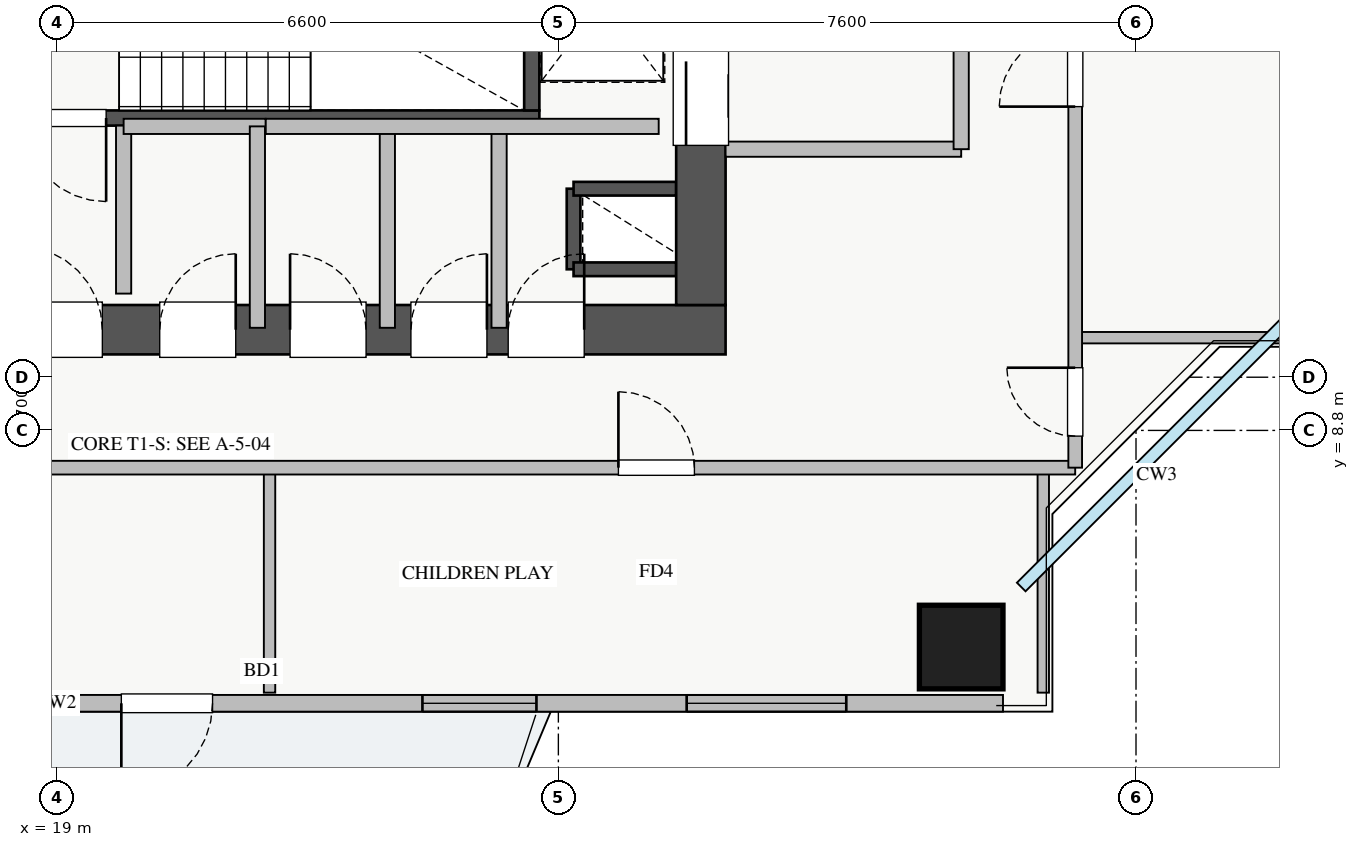
"""IFC4 building model, lengths in metres.
Left out: names, types, materials, properties, quantities, classifications, styles, units other than length and angle.
Written with IfcOpenShell. Run it as: python <this file> out.ifc"""

import sys

from ifc_helpers import new_model, si_unit, direction, frame, frame_2d, origin, origin_2d, place, context, subcontext, project, spatial, rectangle, extrude, source, transform, mapped, element, fill, save


model = new_model("IFC4")
c1 = context("Model", 3, precision=1e-05, world=origin(), true_north=direction((0.0, 1.0)))
c2 = subcontext(c1, "Body", "Model", "MODEL_VIEW")
j1 = project(units=[si_unit("LENGTHUNIT", "METRE"), si_unit("PLANEANGLEUNIT", "RADIAN")], contexts=[c1])
p1 = place(None, origin())
s1 = spatial("IfcSite", under=j1, at=p1, CompositionType="ELEMENT")
p2 = place(p1, origin())
s2 = spatial("IfcBuilding", under=s1, at=p2, CompositionType="ELEMENT")
p3 = place(p2, frame((0.0, 0.0, 132.75)))
s3 = spatial("IfcBuildingStorey", under=s2, at=p3, CompositionType="ELEMENT", Elevation=132.75)
p4 = place(p3, frame((25.8, 10.92, 0.0), z_axis=(0.0, 0.0, 1.0), x_axis=(0.0, 1.0, 0.0)))
e1 = element("IfcWall", 1, at=p4, inside=s3, PredefinedType="SHEAR", context=c2, shape_type="SweptSolid", body=[
    extrude(rectangle(XDim=1.06, YDim=0.18, at=frame_2d((0.53, 0.0))), origin(), (0.0, 0.0, 1.0), 3.07),
])
for number, where, z_axis, x_axis in (
    (2, (25.8, 11.98, 0.0), (0.0, 0.0, 1.0), (1.0, 0.0, 0.0)),
    (3, (25.8, 10.92, 0.0), (0.0, 0.0, 1.0), (1.0, 0.0, 0.0)),
):
    element("IfcWall", number, at=place(p3, frame(where, z_axis=z_axis, x_axis=x_axis)), inside=s3, PredefinedType="SHEAR", context=c2, shape_type="SweptSolid", body=[
        extrude(rectangle(XDim=1.35, YDim=0.18, at=frame_2d((0.675, 0.0))), origin(), (0.0, 0.0, 1.0), 3.07),
    ])
p5 = place(p3, frame((18.2, 12.91, 0.0), z_axis=(0.0, 0.0, 1.0), x_axis=(1.0, 0.0, 0.0)))
e4 = element("IfcWall", 4, at=p5, inside=s3, PredefinedType="SHEAR", context=c2, shape_type="SweptSolid", body=[
    extrude(rectangle(XDim=7.15, YDim=0.2, at=frame_2d((3.575, 0.0))), origin(), (0.0, 0.0, 1.0), 3.25),
])
p6 = place(p5, frame((0.35, 0.0, 0.0)))
e5 = element("IfcOpeningElement", 5, at=p6, cuts=e4, PredefinedType="OPENING", context=c2, shape_type="SweptSolid", body=[
    extrude(rectangle(XDim=1.1, YDim=2.05, at=frame_2d((0.55, 1.025))), frame((0.0, 0.11, 0.0), z_axis=(0.0, -1.0, 0.0), x_axis=(1.0, 0.0, 0.0)), (0.0, 0.0, 1.0), 0.22),
])
p7 = place(p3, frame((25.25, 13.01, 0.0), z_axis=(0.0, 0.0, 1.0), x_axis=(0.0, 1.0, 0.0)))
e6 = element("IfcWall", 6, at=p7, inside=s3, PredefinedType="SHEAR", context=c2, shape_type="SweptSolid", body=[
    extrude(rectangle(XDim=2.94, YDim=0.2, at=frame_2d((1.47, 0.0))), origin(), (0.0, 0.0, 1.0), 3.25),
])
p8 = place(p3, frame((10.2, 10.125, 0.0), z_axis=(0.0, 0.0, 1.0), x_axis=(1.0, 0.0, 0.0)))
e7 = element("IfcWall", 7, at=p8, inside=s3, PredefinedType="SHEAR", context=c2, shape_type="SweptSolid", body=[
    extrude(rectangle(XDim=17.6, YDim=0.65, at=frame_2d((8.8, 0.0))), origin(), (0.0, 0.0, 1.0), 3.25),
])
p9 = place(p8, frame((1.15, 0.0, 0.0)))
e8 = element("IfcOpeningElement", 8, at=p9, cuts=e7, PredefinedType="OPENING", context=c2, shape_type="SweptSolid", body=[
    extrude(rectangle(XDim=1.1, YDim=2.05, at=frame_2d((0.55, 1.025))), frame((0.0, 0.335, 0.0), z_axis=(0.0, -1.0, 0.0), x_axis=(1.0, 0.0, 0.0)), (0.0, 0.0, 1.0), 0.67),
])
p10 = place(p8, frame((8.3, 0.0, 0.0)))
e9 = element("IfcOpeningElement", 9, at=p10, cuts=e7, PredefinedType="OPENING", context=c2, shape_type="SweptSolid", body=[
    extrude(rectangle(XDim=1.1, YDim=2.05, at=frame_2d((0.55, 1.025))), frame((0.0, 0.335, 0.0), z_axis=(0.0, -1.0, 0.0), x_axis=(1.0, 0.0, 0.0)), (0.0, 0.0, 1.0), 0.67),
])
p11 = place(p8, frame((4.9, 0.0, 0.0)))
e10 = element("IfcOpeningElement", 10, at=p11, cuts=e7, PredefinedType="OPENING", context=c2, shape_type="SweptSolid", body=[
    extrude(rectangle(XDim=1.1, YDim=2.05, at=frame_2d((0.55, 1.025))), frame((0.0, 0.335, 0.0), z_axis=(0.0, -1.0, 0.0), x_axis=(1.0, 0.0, 0.0)), (0.0, 0.0, 1.0), 0.67),
])
p12 = place(p8, frame((14.74, 0.0, 0.0)))
e11 = element("IfcOpeningElement", 11, at=p12, cuts=e7, PredefinedType="OPENING", context=c2, shape_type="SweptSolid", body=[
    extrude(rectangle(XDim=1.0, YDim=2.05, at=frame_2d((0.5, 1.025))), frame((0.0, 0.335, 0.0), z_axis=(0.0, -1.0, 0.0), x_axis=(1.0, 0.0, 0.0)), (0.0, 0.0, 1.0), 0.67),
])
p13 = place(p8, frame((10.155, 0.0, 0.0)))
e12 = element("IfcOpeningElement", 12, at=p13, cuts=e7, PredefinedType="OPENING", context=c2, shape_type="SweptSolid", body=[
    extrude(rectangle(XDim=1.0, YDim=2.05, at=frame_2d((0.5, 1.025))), frame((0.0, 0.335, 0.0), z_axis=(0.0, -1.0, 0.0), x_axis=(1.0, 0.0, 0.0)), (0.0, 0.0, 1.0), 0.67),
])
p14 = place(p8, frame((11.87, 0.0, 0.0)))
e13 = element("IfcOpeningElement", 13, at=p14, cuts=e7, PredefinedType="OPENING", context=c2, shape_type="SweptSolid", body=[
    extrude(rectangle(XDim=1.0, YDim=2.05, at=frame_2d((0.5, 1.025))), frame((0.0, 0.335, 0.0), z_axis=(0.0, -1.0, 0.0), x_axis=(1.0, 0.0, 0.0)), (0.0, 0.0, 1.0), 0.67),
])
p15 = place(p8, frame((13.46, 0.0, 0.0)))
e14 = element("IfcOpeningElement", 14, at=p15, cuts=e7, PredefinedType="OPENING", context=c2, shape_type="SweptSolid", body=[
    extrude(rectangle(XDim=1.0, YDim=2.05, at=frame_2d((0.5, 1.025))), frame((0.0, 0.335, 0.0), z_axis=(0.0, -1.0, 0.0), x_axis=(1.0, 0.0, 0.0)), (0.0, 0.0, 1.0), 0.67),
])
p16 = place(p3, frame((27.475, 10.45, 0.0), z_axis=(0.0, 0.0, 1.0), x_axis=(0.0, 1.0, 0.0)))
e15 = element("IfcWall", 15, at=p16, inside=s3, PredefinedType="SHEAR", context=c2, shape_type="SweptSolid", body=[
    extrude(rectangle(XDim=5.9, YDim=0.65, at=frame_2d((2.95, 0.0))), origin(), (0.0, 0.0, 1.0), 3.25),
])
p17 = place(p16, frame((2.1, 0.0, 0.0)))
e16 = element("IfcOpeningElement", 16, at=p17, cuts=e15, PredefinedType="OPENING", context=c2, shape_type="SweptSolid", body=[
    extrude(rectangle(XDim=1.3, YDim=2.05, at=frame_2d((0.65, 1.025))), frame((0.0, 0.335, 0.0), z_axis=(0.0, -1.0, 0.0), x_axis=(1.0, 0.0, 0.0)), (0.0, 0.0, 1.0), 0.67),
])
m1 = source(origin(), c2, "Body", "SweptSolid", [
    extrude(rectangle(XDim=1.1, YDim=1.1, at=origin_2d()), origin(), (0.0, 0.0, 1.0), 3.25),
])
p18 = place(p3, frame((30.9, 5.95, 0.0), z_axis=(0.0, 0.0, 1.0), x_axis=(1.0, 0.0, 0.0)))
e17 = element("IfcColumn", 17, at=p18, inside=s3, PredefinedType="COLUMN", context=c2, shape_type="MappedRepresentation", body=[
    mapped(m1, transform((0.0, 0.0, 0.0), x_axis=(1.0, 0.0, 0.0), y_axis=(0.0, 1.0, 0.0), z_axis=(0.0, 0.0, 1.0), scale=1.0)),
])
p19 = place(p3, frame((6.55, 5.21, 0.0), z_axis=(0.0, 0.0, 1.0), x_axis=(1.0, 0.0, 0.0)))
e18 = element("IfcWall", 18, at=p19, inside=s3, PredefinedType="STANDARD", context=c2, shape_type="SweptSolid", body=[
    extrude(rectangle(XDim=24.9, YDim=0.22, at=frame_2d((12.45, 0.0))), origin(), (0.0, 0.0, 1.0), 2.61),
])
p20 = place(p19, frame((13.3, 0.0, 0.0)))
e19 = element("IfcOpeningElement", 19, at=p20, cuts=e18, PredefinedType="OPENING", context=c2, shape_type="SweptSolid", body=[
    extrude(rectangle(XDim=1.2, YDim=2.1, at=frame_2d((0.6, 1.05))), frame((0.0, 0.12, 0.0), z_axis=(0.0, -1.0, 0.0), x_axis=(1.0, 0.0, 0.0)), (0.0, 0.0, 1.0), 0.24),
])
p21 = place(p19, frame((0.393, 0.0, 0.9)))
e20 = element("IfcOpeningElement", 20, at=p21, cuts=e18, PredefinedType="OPENING", context=c2, shape_type="SweptSolid", body=[
    extrude(rectangle(XDim=1.5, YDim=1.5, at=frame_2d((0.75, 0.75))), frame((0.0, 0.12, 0.0), z_axis=(0.0, -1.0, 0.0), x_axis=(1.0, 0.0, 0.0)), (0.0, 0.0, 1.0), 0.24),
])
p22 = place(p19, frame((8.438, 0.0, 0.9)))
e21 = element("IfcOpeningElement", 21, at=p22, cuts=e18, PredefinedType="OPENING", context=c2, shape_type="SweptSolid", body=[
    extrude(rectangle(XDim=1.8, YDim=1.45, at=frame_2d((0.9, 0.725))), frame((0.0, 0.12, 0.0), z_axis=(0.0, -1.0, 0.0), x_axis=(1.0, 0.0, 0.0)), (0.0, 0.0, 1.0), 0.24),
])
p23 = place(p19, frame((17.261, 0.0, 0.9)))
e22 = element("IfcOpeningElement", 22, at=p23, cuts=e18, PredefinedType="OPENING", context=c2, shape_type="SweptSolid", body=[
    extrude(rectangle(XDim=1.5, YDim=1.5, at=frame_2d((0.75, 0.75))), frame((0.0, 0.12, 0.0), z_axis=(0.0, -1.0, 0.0), x_axis=(1.0, 0.0, 0.0)), (0.0, 0.0, 1.0), 0.24),
])
p24 = place(p19, frame((20.738, 0.0, 0.9)))
e23 = element("IfcOpeningElement", 23, at=p24, cuts=e18, PredefinedType="OPENING", context=c2, shape_type="SweptSolid", body=[
    extrude(rectangle(XDim=2.1, YDim=1.48, at=frame_2d((1.05, 0.74))), frame((0.0, 0.12, 0.0), z_axis=(0.0, -1.0, 0.0), x_axis=(1.0, 0.0, 0.0)), (0.0, 0.0, 1.0), 0.24),
])
p25 = place(p19, frame((4.171, 0.0, 0.9)))
e24 = element("IfcOpeningElement", 24, at=p25, cuts=e18, PredefinedType="OPENING", context=c2, shape_type="SweptSolid", body=[
    extrude(rectangle(XDim=2.4, YDim=1.5, at=frame_2d((1.2, 0.75))), frame((0.0, 0.12, 0.0), z_axis=(0.0, -1.0, 0.0), x_axis=(1.0, 0.0, 0.0)), (0.0, 0.0, 1.0), 0.24),
])
p26 = place(p3, frame((27.8, 12.5, 0.0), z_axis=(0.0, 0.0, 1.0), x_axis=(1.0, 0.0, 0.0)))
e25 = element("IfcWall", 25, at=p26, inside=s3, PredefinedType="PARTITIONING", context=c2, shape_type="SweptSolid", body=[
    extrude(rectangle(XDim=3.1, YDim=0.2, at=frame_2d((1.55, 0.0))), origin(), (0.0, 0.0, 1.0), 3.07),
])
p27 = place(p3, frame((30.9, 12.5, 0.0), z_axis=(0.0, 0.0, 1.0), x_axis=(0.0, 1.0, 0.0)))
e26 = element("IfcWall", 26, at=p27, inside=s3, PredefinedType="PARTITIONING", context=c2, shape_type="SweptSolid", body=[
    extrude(rectangle(XDim=3.9, YDim=0.2, at=frame_2d((1.95, 0.0))), origin(), (0.0, 0.0, 1.0), 3.07),
])
p28 = place(p27, frame((1.4, 0.0, 0.0)))
e27 = element("IfcOpeningElement", 27, at=p28, cuts=e26, PredefinedType="OPENING", context=c2, shape_type="SweptSolid", body=[
    extrude(rectangle(XDim=1.1, YDim=2.05, at=frame_2d((0.55, 1.025))), frame((0.0, 0.11, 0.0), z_axis=(0.0, -1.0, 0.0), x_axis=(1.0, 0.0, 0.0)), (0.0, 0.0, 1.0), 0.22),
])
p29 = place(p3, frame((19.88, 10.6, 0.0), z_axis=(0.0, 0.0, 1.0), x_axis=(0.0, 1.0, 0.0)))
e28 = element("IfcWall", 28, at=p29, inside=s3, PredefinedType="PARTITIONING", context=c2, shape_type="SweptSolid", body=[
    extrude(rectangle(XDim=2.21, YDim=0.2, at=frame_2d((1.105, 0.0))), origin(), (0.0, 0.0, 1.0), 3.07),
])
p30 = place(p3, frame((24.82, 10.15, 0.0), z_axis=(0.0, 0.0, 1.0), x_axis=(0.0, 1.0, 0.0)))
e29 = element("IfcWall", 29, at=p30, inside=s3, PredefinedType="PARTITIONING", context=c2, shape_type="SweptSolid", body=[
    extrude(rectangle(XDim=2.65, YDim=0.2, at=frame_2d((1.325, 0.0))), origin(), (0.0, 0.0, 1.0), 3.07),
])
p31 = place(p3, frame((19.88, 12.8, 0.0), z_axis=(0.0, 0.0, 1.0), x_axis=(1.0, 0.0, 0.0)))
e30 = element("IfcWall", 30, at=p31, inside=s3, PredefinedType="PARTITIONING", context=c2, shape_type="SweptSolid", body=[
    extrude(rectangle(XDim=1.87, YDim=0.2, at=frame_2d((0.935, 0.0))), origin(), (0.0, 0.0, 1.0), 3.07),
])
for number, where, z_axis, x_axis in (
    (31, (21.64, 10.15, 0.0), (0.0, 0.0, 1.0), (0.0, 1.0, 0.0)),
    (32, (23.35, 10.15, 0.0), (0.0, 0.0, 1.0), (0.0, 1.0, 0.0)),
):
    element("IfcWall", number, at=place(p3, frame(where, z_axis=z_axis, x_axis=x_axis)), inside=s3, PredefinedType="PARTITIONING", context=c2, shape_type="SweptSolid", body=[
        extrude(rectangle(XDim=2.65, YDim=0.2, at=frame_2d((1.325, 0.0))), origin(), (0.0, 0.0, 1.0), 3.07),
    ])
p32 = place(p3, frame((21.75, 12.8, 0.0), z_axis=(0.0, 0.0, 1.0), x_axis=(1.0, 0.0, 0.0)))
e33 = element("IfcWall", 33, at=p32, inside=s3, PredefinedType="PARTITIONING", context=c2, shape_type="SweptSolid", body=[
    extrude(rectangle(XDim=5.17, YDim=0.2, at=frame_2d((2.585, 0.0))), origin(), (0.0, 0.0, 1.0), 3.07),
])
for number, where, z_axis, x_axis in (
    (34, (21.8, 5.35, 0.0), (0.0, 0.0, 1.0), (0.0, 1.0, 0.0)),
    (35, (31.98, 5.35, 0.0), (0.0, 0.0, 1.0), (0.0, 1.0, 0.0)),
):
    element("IfcWall", number, at=place(p3, frame(where, z_axis=z_axis, x_axis=x_axis)), inside=s3, PredefinedType="PARTITIONING", context=c2, shape_type="SweptSolid", body=[
        extrude(rectangle(XDim=2.96, YDim=0.15, at=frame_2d((1.48, 0.0))), origin(), (0.0, 0.0, 1.0), 3.07),
    ])
p33 = place(p3, frame((8.82, 8.31, 0.0), z_axis=(0.0, 0.0, 1.0), x_axis=(1.0, 0.0, 0.0)))
e36 = element("IfcWall", 36, at=p33, inside=s3, PredefinedType="PARTITIONING", context=c2, shape_type="SweptSolid", body=[
    extrude(rectangle(XDim=23.58, YDim=0.18, at=frame_2d((11.79, 0.0))), origin(), (0.0, 0.0, 1.0), 3.07),
])
p34 = place(p33, frame((5.99, 0.0, 0.0)))
e37 = element("IfcOpeningElement", 37, at=p34, cuts=e36, PredefinedType="OPENING", context=c2, shape_type="SweptSolid", body=[
    extrude(rectangle(XDim=1.0, YDim=2.05, at=frame_2d((0.5, 1.025))), frame((0.0, 0.1, 0.0), z_axis=(0.0, -1.0, 0.0), x_axis=(1.0, 0.0, 0.0)), (0.0, 0.0, 1.0), 0.2),
])
p35 = place(p33, frame((17.57, 0.0, 0.0)))
e38 = element("IfcOpeningElement", 38, at=p35, cuts=e36, PredefinedType="OPENING", context=c2, shape_type="SweptSolid", body=[
    extrude(rectangle(XDim=1.0, YDim=2.05, at=frame_2d((0.5, 1.025))), frame((0.0, 0.1, 0.0), z_axis=(0.0, -1.0, 0.0), x_axis=(1.0, 0.0, 0.0)), (0.0, 0.0, 1.0), 0.2),
])
p36 = place(p3, frame((32.4, 10.02, 0.0), z_axis=(0.0, 0.0, 1.0), x_axis=(1.0, 0.0, 0.0)))
e39 = element("IfcWall", 39, at=p36, inside=s3, PredefinedType="PARTITIONING", context=c2, shape_type="SweptSolid", body=[
    extrude(rectangle(XDim=4.25, YDim=0.15, at=frame_2d((2.125, 0.0))), origin(), (0.0, 0.0, 1.0), 3.07),
])
p37 = place(p3, frame((32.4, 8.31, 0.0), z_axis=(0.0, 0.0, 1.0), x_axis=(0.0, 1.0, 0.0)))
e40 = element("IfcWall", 40, at=p37, inside=s3, PredefinedType="PARTITIONING", context=c2, shape_type="SweptSolid", body=[
    extrude(rectangle(XDim=29.13, YDim=0.18, at=frame_2d((14.565, 0.0))), origin(), (0.0, 0.0, 1.0), 3.07),
])
p38 = place(p37, frame((27.94, 0.0, 0.0)))
e41 = element("IfcOpeningElement", 41, at=p38, cuts=e40, PredefinedType="OPENING", context=c2, shape_type="SweptSolid", body=[
    extrude(rectangle(XDim=0.9, YDim=2.05, at=frame_2d((0.45, 1.025))), frame((0.0, 0.1, 0.0), z_axis=(0.0, -1.0, 0.0), x_axis=(1.0, 0.0, 0.0)), (0.0, 0.0, 1.0), 0.2),
])
p39 = place(p37, frame((0.415, 0.0, 0.0)))
e42 = element("IfcOpeningElement", 42, at=p39, cuts=e40, PredefinedType="OPENING", context=c2, shape_type="SweptSolid", body=[
    extrude(rectangle(XDim=0.9, YDim=2.05, at=frame_2d((0.45, 1.025))), frame((0.0, 0.1, 0.0), z_axis=(0.0, -1.0, 0.0), x_axis=(1.0, 0.0, 0.0)), (0.0, 0.0, 1.0), 0.2),
])
p40 = place(p37, frame((4.75, 0.0, 0.0)))
e43 = element("IfcOpeningElement", 43, at=p40, cuts=e40, PredefinedType="OPENING", context=c2, shape_type="SweptSolid", body=[
    extrude(rectangle(XDim=1.0, YDim=2.05, at=frame_2d((0.5, 1.025))), frame((0.0, 0.1, 0.0), z_axis=(0.0, -1.0, 0.0), x_axis=(1.0, 0.0, 0.0)), (0.0, 0.0, 1.0), 0.2),
])
p41 = place(p37, frame((18.11, 0.0, 0.0)))
e44 = element("IfcOpeningElement", 44, at=p41, cuts=e40, PredefinedType="OPENING", context=c2, shape_type="SweptSolid", body=[
    extrude(rectangle(XDim=1.0, YDim=2.05, at=frame_2d((0.5, 1.025))), frame((0.0, 0.1, 0.0), z_axis=(0.0, -1.0, 0.0), x_axis=(1.0, 0.0, 0.0)), (0.0, 0.0, 1.0), 0.2),
])
m2 = source(origin(), c2, "Body", "SweptSolid", [
    extrude(rectangle(XDim=1.2, YDim=2.1, at=frame_2d((0.6, 1.05))), frame((0.0, 0.025, 0.0), z_axis=(0.0, -1.0, 0.0), x_axis=(1.0, 0.0, 0.0)), (0.0, 0.0, 1.0), 0.05),
])
p42 = place(p20, frame((1.2, 0.0, 0.0), z_axis=(0.0, 0.0, 1.0), x_axis=(-1.0, 0.0, 0.0)))
e45 = element("IfcDoor", 45, at=p42, inside=s3, OperationType="SINGLE_SWING_LEFT", PredefinedType="DOOR", context=c2, shape_type="MappedRepresentation", body=[
    mapped(m2, transform((0.0, 0.0, 0.0), x_axis=(1.0, 0.0, 0.0), y_axis=(0.0, 1.0, 0.0), z_axis=(0.0, 0.0, 1.0), scale=1.0)),
])
fill(e19, e45)
m3 = source(origin(), c2, "Body", "SweptSolid", [
    extrude(rectangle(XDim=1.5, YDim=1.5, at=frame_2d((0.75, 0.75))), frame((0.0, 0.03, 0.0), z_axis=(0.0, -1.0, 0.0), x_axis=(1.0, 0.0, 0.0)), (0.0, 0.0, 1.0), 0.06),
])
p43 = place(p23, origin())
e46 = element("IfcWindow", 46, at=p43, inside=s3, PartitioningType="DOUBLE_PANEL_VERTICAL", PredefinedType="WINDOW", context=c2, shape_type="MappedRepresentation", body=[
    mapped(m3, transform((0.0, 0.0, 0.0), x_axis=(1.0, 0.0, 0.0), y_axis=(0.0, 1.0, 0.0), z_axis=(0.0, 0.0, 1.0), scale=1.0)),
])
fill(e22, e46)
m4 = source(origin(), c2, "Body", "SweptSolid", [
    extrude(rectangle(XDim=2.1, YDim=1.48, at=frame_2d((1.05, 0.74))), frame((0.0, 0.03, 0.0), z_axis=(0.0, -1.0, 0.0), x_axis=(1.0, 0.0, 0.0)), (0.0, 0.0, 1.0), 0.06),
])
p44 = place(p24, origin())
e47 = element("IfcWindow", 47, at=p44, inside=s3, PartitioningType="TRIPLE_PANEL_VERTICAL", PredefinedType="WINDOW", context=c2, shape_type="MappedRepresentation", body=[
    mapped(m4, transform((0.0, 0.0, 0.0), x_axis=(1.0, 0.0, 0.0), y_axis=(0.0, 1.0, 0.0), z_axis=(0.0, 0.0, 1.0), scale=1.0)),
])
fill(e23, e47)
m5 = source(origin(), c2, "Body", "SweptSolid", [
    extrude(rectangle(XDim=1.3, YDim=2.05, at=frame_2d((0.65, 1.025))), frame((0.0, 0.025, 0.0), z_axis=(0.0, -1.0, 0.0), x_axis=(1.0, 0.0, 0.0)), (0.0, 0.0, 1.0), 0.05),
])
p45 = place(p17, origin())
e48 = element("IfcDoor", 48, at=p45, inside=s3, OperationType="SLIDING_TO_RIGHT", PredefinedType="DOOR", context=c2, shape_type="MappedRepresentation", body=[
    mapped(m5, transform((0.0, 0.0, 0.0), x_axis=(1.0, 0.0, 0.0), y_axis=(0.0, 1.0, 0.0), z_axis=(0.0, 0.0, 1.0), scale=1.0)),
])
fill(e16, e48)
m6 = source(origin(), c2, "Body", "SweptSolid", [
    extrude(rectangle(XDim=1.1, YDim=2.05, at=frame_2d((0.55, 1.025))), frame((0.0, 0.025, 0.0), z_axis=(0.0, -1.0, 0.0), x_axis=(1.0, 0.0, 0.0)), (0.0, 0.0, 1.0), 0.05),
])
p46 = place(p10, origin())
e49 = element("IfcDoor", 49, at=p46, inside=s3, OperationType="SINGLE_SWING_LEFT", PredefinedType="DOOR", context=c2, shape_type="MappedRepresentation", body=[
    mapped(m6, transform((0.0, 0.0, 0.0), x_axis=(1.0, 0.0, 0.0), y_axis=(0.0, 1.0, 0.0), z_axis=(0.0, 0.0, 1.0), scale=1.0)),
])
fill(e9, e49)
p47 = place(p6, frame((1.1, 0.0, 0.0), z_axis=(0.0, 0.0, 1.0), x_axis=(-1.0, 0.0, 0.0)))
e50 = element("IfcDoor", 50, at=p47, inside=s3, OperationType="SINGLE_SWING_RIGHT", PredefinedType="DOOR", context=c2, shape_type="MappedRepresentation", body=[
    mapped(m6, transform((0.0, 0.0, 0.0), x_axis=(1.0, 0.0, 0.0), y_axis=(0.0, 1.0, 0.0), z_axis=(0.0, 0.0, 1.0), scale=1.0)),
])
fill(e5, e50)
m7 = source(origin(), c2, "Body", "SweptSolid", [
    extrude(rectangle(XDim=1.0, YDim=2.05, at=frame_2d((0.5, 1.025))), frame((0.0, 0.025, 0.0), z_axis=(0.0, -1.0, 0.0), x_axis=(1.0, 0.0, 0.0)), (0.0, 0.0, 1.0), 0.05),
])
p48 = place(p12, origin())
e51 = element("IfcDoor", 51, at=p48, inside=s3, OperationType="SINGLE_SWING_RIGHT", PredefinedType="DOOR", context=c2, shape_type="MappedRepresentation", body=[
    mapped(m7, transform((0.0, 0.0, 0.0), x_axis=(1.0, 0.0, 0.0), y_axis=(0.0, 1.0, 0.0), z_axis=(0.0, 0.0, 1.0), scale=1.0)),
])
fill(e11, e51)
p49 = place(p13, origin())
e52 = element("IfcDoor", 52, at=p49, inside=s3, OperationType="SINGLE_SWING_RIGHT", PredefinedType="DOOR", context=c2, shape_type="MappedRepresentation", body=[
    mapped(m7, transform((0.0, 0.0, 0.0), x_axis=(1.0, 0.0, 0.0), y_axis=(0.0, 1.0, 0.0), z_axis=(0.0, 0.0, 1.0), scale=1.0)),
])
fill(e12, e52)
p50 = place(p14, origin())
e53 = element("IfcDoor", 53, at=p50, inside=s3, OperationType="SINGLE_SWING_LEFT", PredefinedType="DOOR", context=c2, shape_type="MappedRepresentation", body=[
    mapped(m7, transform((0.0, 0.0, 0.0), x_axis=(1.0, 0.0, 0.0), y_axis=(0.0, 1.0, 0.0), z_axis=(0.0, 0.0, 1.0), scale=1.0)),
])
fill(e13, e53)
p51 = place(p15, origin())
e54 = element("IfcDoor", 54, at=p51, inside=s3, OperationType="SINGLE_SWING_RIGHT", PredefinedType="DOOR", context=c2, shape_type="MappedRepresentation", body=[
    mapped(m7, transform((0.0, 0.0, 0.0), x_axis=(1.0, 0.0, 0.0), y_axis=(0.0, 1.0, 0.0), z_axis=(0.0, 0.0, 1.0), scale=1.0)),
])
fill(e14, e54)
p52 = place(p35, origin())
e55 = element("IfcDoor", 55, at=p52, inside=s3, OperationType="SINGLE_SWING_LEFT", PredefinedType="DOOR", context=c2, shape_type="MappedRepresentation", body=[
    mapped(m7, transform((0.0, 0.0, 0.0), x_axis=(1.0, 0.0, 0.0), y_axis=(0.0, 1.0, 0.0), z_axis=(0.0, 0.0, 1.0), scale=1.0)),
])
fill(e38, e55)
m8 = source(origin(), c2, "Body", "SweptSolid", [
    extrude(rectangle(XDim=0.9, YDim=2.05, at=frame_2d((0.45, 1.025))), frame((0.0, 0.025, 0.0), z_axis=(0.0, -1.0, 0.0), x_axis=(1.0, 0.0, 0.0)), (0.0, 0.0, 1.0), 0.05),
])
p53 = place(p39, origin())
e56 = element("IfcDoor", 56, at=p53, inside=s3, OperationType="SINGLE_SWING_RIGHT", PredefinedType="DOOR", context=c2, shape_type="MappedRepresentation", body=[
    mapped(m8, transform((0.0, 0.0, 0.0), x_axis=(1.0, 0.0, 0.0), y_axis=(0.0, 1.0, 0.0), z_axis=(0.0, 0.0, 1.0), scale=1.0)),
])
fill(e42, e56)
p54 = place(p40, origin())
e57 = element("IfcDoor", 57, at=p54, inside=s3, OperationType="SINGLE_SWING_LEFT", PredefinedType="DOOR", context=c2, shape_type="MappedRepresentation", body=[
    mapped(m7, transform((0.0, 0.0, 0.0), x_axis=(1.0, 0.0, 0.0), y_axis=(0.0, 1.0, 0.0), z_axis=(0.0, 0.0, 1.0), scale=1.0)),
])
fill(e43, e57)
save(model, sys.argv[1])
